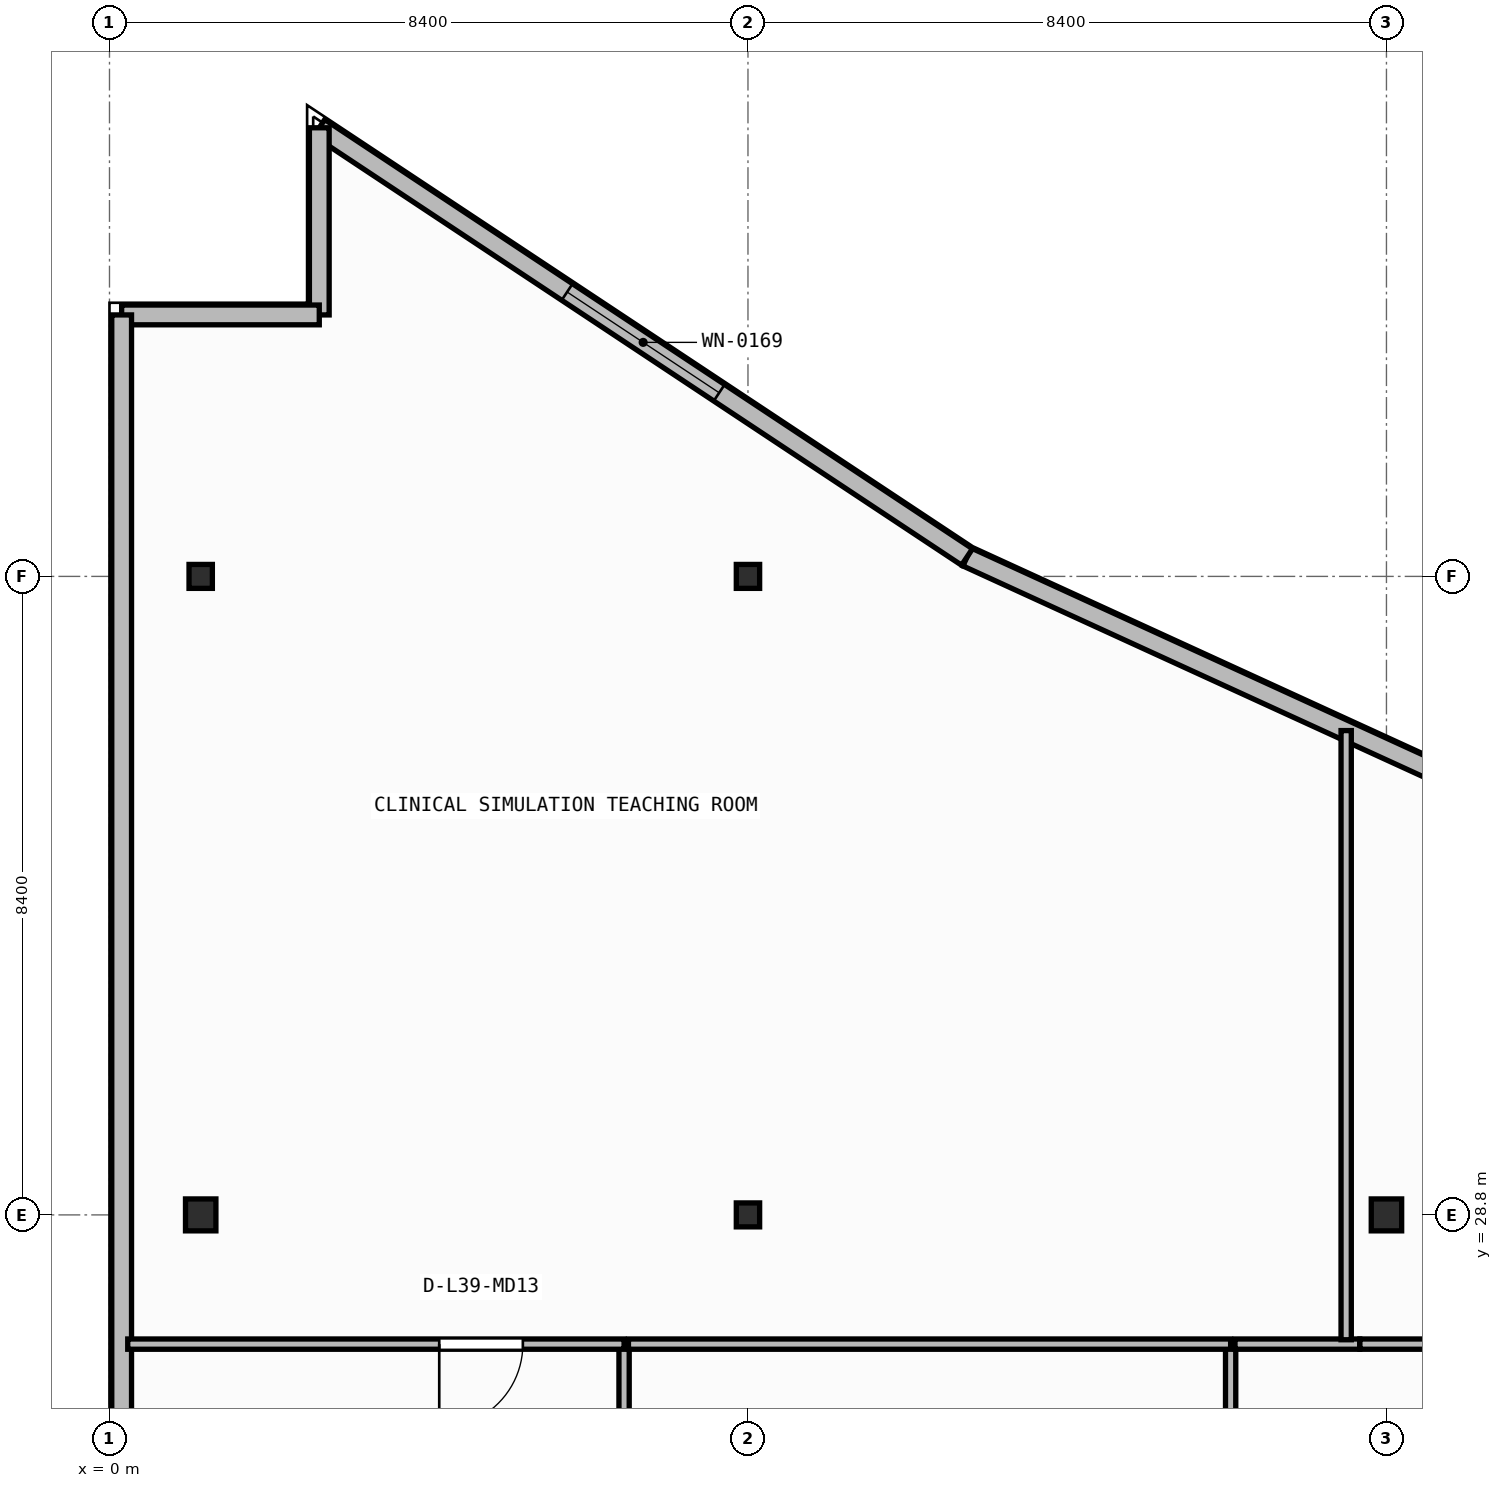
"""IFC4 building model, lengths in metres.
Left out: names, types, materials, properties, quantities, classifications, styles, units other than length and angle.
Written with IfcOpenShell. Run it as: python <this file> out.ifc"""

import sys

from ifc_helpers import new_model, si_unit, direction, frame, frame_2d, origin, origin_2d, place, context, subcontext, project, spatial, rectangle, i_section, extrude, element, fill, save


model = new_model("IFC4")
c1 = context("Model", 3, precision=1e-05, world=origin(), true_north=direction((0.0, 1.0)))
c2 = subcontext(c1, "Body", "Model", "MODEL_VIEW")
j1 = project(units=[si_unit("LENGTHUNIT", "METRE"), si_unit("PLANEANGLEUNIT", "RADIAN")], contexts=[c1])
p1 = place(None, origin())
s1 = spatial("IfcSite", under=j1, at=p1, CompositionType="ELEMENT")
p2 = place(p1, origin())
s2 = spatial("IfcBuilding", under=s1, at=p2, CompositionType="ELEMENT")
p3 = place(p2, frame((0.0, 0.0, 158.65)))
s3 = spatial("IfcBuildingStorey", under=s2, at=p3, CompositionType="ELEMENT", Elevation=158.65)
p4 = place(p3, frame((1.2, 28.8, 0.0), z_axis=(0.0, 0.0, 1.0), x_axis=(1.0, 0.0, 0.0)))
e1 = element("IfcColumn", 1, at=p4, inside=s3, PredefinedType="COLUMN", context=c2, shape_type="SweptSolid", body=[
    extrude(i_section(OverallWidth=0.4, OverallDepth=0.42, WebThickness=0.025, FlangeThickness=0.04, at=origin_2d()), origin(), (0.0, 0.0, 1.0), 3.95),
])
p5 = place(p3, frame((8.4, 28.8, 0.0), z_axis=(0.0, 0.0, 1.0), x_axis=(1.0, 0.0, 0.0)))
e2 = element("IfcColumn", 2, at=p5, inside=s3, PredefinedType="COLUMN", context=c2, shape_type="SweptSolid", body=[
    extrude(i_section(OverallWidth=0.307, OverallDepth=0.315, WebThickness=0.012, FlangeThickness=0.019, FilletRadius=0.017, at=origin_2d()), origin(), (0.0, 0.0, 1.0), 3.95),
])
p6 = place(p3, frame((16.8, 28.8, 0.0), z_axis=(0.0, 0.0, 1.0), x_axis=(1.0, 0.0, 0.0)))
e3 = element("IfcColumn", 3, at=p6, inside=s3, PredefinedType="COLUMN", context=c2, shape_type="SweptSolid", body=[
    extrude(i_section(OverallWidth=0.4, OverallDepth=0.42, WebThickness=0.025, FlangeThickness=0.04, at=origin_2d()), origin(), (0.0, 0.0, 1.0), 3.95),
])
for number, where, z_axis, x_axis in (
    (4, (1.2, 37.2, 0.0), (0.0, 0.0, 1.0), (1.0, 0.0, 0.0)),
    (5, (8.4, 37.2, 0.0), (0.0, 0.0, 1.0), (1.0, 0.0, 0.0)),
):
    element("IfcColumn", number, at=place(p3, frame(where, z_axis=z_axis, x_axis=x_axis)), inside=s3, PredefinedType="COLUMN", context=c2, shape_type="SweptSolid", body=[
        extrude(i_section(OverallWidth=0.307, OverallDepth=0.315, WebThickness=0.012, FlangeThickness=0.019, FilletRadius=0.017, at=origin_2d()), origin(), (0.0, 0.0, 1.0), 3.95),
    ])
p7 = place(p3, frame((23.818, 31.716, 0.0), z_axis=(0.0, 0.0, 1.0), x_axis=(-0.909209527513, 0.416338846471, 0.0)))
e6 = element("IfcWall", 6, at=p7, inside=s3, PredefinedType="STANDARD", context=c2, shape_type="SweptSolid", body=[
    extrude(rectangle(XDim=13.787, YDim=0.26, at=frame_2d((6.894, 0.0))), origin(), (0.0, 0.0, 1.0), 3.71),
])
p8 = place(p7, frame((3.829, 0.0, 0.9)))
e7 = element("IfcOpeningElement", 7, at=p8, cuts=e6, PredefinedType="OPENING", context=c2, shape_type="SweptSolid", body=[
    extrude(rectangle(XDim=2.4, YDim=1.65, at=frame_2d((1.2, 0.825))), frame((0.0, 0.14, 0.0), z_axis=(0.0, -1.0, 0.0), x_axis=(1.0, 0.0, 0.0)), (0.0, 0.0, 1.0), 0.28),
])
p9 = place(p3, frame((11.282, 37.456, 0.0), z_axis=(0.0, 0.0, 1.0), x_axis=(-0.833630474253, 0.552322580017, 0.0)))
e8 = element("IfcWall", 8, at=p9, inside=s3, PredefinedType="STANDARD", context=c2, shape_type="SweptSolid", body=[
    extrude(rectangle(XDim=10.223, YDim=0.26, at=frame_2d((5.111, 0.0))), origin(), (0.0, 0.0, 1.0), 3.71),
])
p10 = place(p9, frame((3.911, 0.0, 0.9)))
e9 = element("IfcOpeningElement", 9, at=p10, cuts=e8, PredefinedType="OPENING", context=c2, shape_type="SweptSolid", body=[
    extrude(rectangle(XDim=2.4, YDim=1.65, at=frame_2d((1.2, 0.825))), frame((0.0, 0.14, 0.0), z_axis=(0.0, -1.0, 0.0), x_axis=(1.0, 0.0, 0.0)), (0.0, 0.0, 1.0), 0.28),
])
p11 = place(p3, frame((2.76, 43.102, 0.0), z_axis=(0.0, 0.0, 1.0), x_axis=(0.0, -1.0, 0.0)))
e10 = element("IfcWall", 10, at=p11, inside=s3, PredefinedType="STANDARD", context=c2, shape_type="SweptSolid", body=[
    extrude(rectangle(XDim=2.462, YDim=0.26, at=frame_2d((1.231, 0.0))), origin(), (0.0, 0.0, 1.0), 3.71),
])
p12 = place(p3, frame((2.76, 40.64, 0.0), z_axis=(0.0, 0.0, 1.0), x_axis=(-1.0, 0.0, 0.0)))
e11 = element("IfcWall", 11, at=p12, inside=s3, PredefinedType="STANDARD", context=c2, shape_type="SweptSolid", body=[
    extrude(rectangle(XDim=2.6, YDim=0.26, at=frame_2d((1.3, 0.0))), origin(), (0.0, 0.0, 1.0), 3.71),
])
p13 = place(p3, frame((0.16, 40.64, 0.0), z_axis=(0.0, 0.0, 1.0), x_axis=(0.0, -1.0, 0.0)))
e12 = element("IfcWall", 12, at=p13, inside=s3, PredefinedType="STANDARD", context=c2, shape_type="SweptSolid", body=[
    extrude(rectangle(XDim=37.88, YDim=0.26, at=frame_2d((18.94, 0.0))), origin(), (0.0, 0.0, 1.0), 3.71),
])
p14 = place(p13, frame((29.865, 0.0, 0.0)))
e13 = element("IfcOpeningElement", 13, at=p14, cuts=e12, PredefinedType="OPENING", context=c2, shape_type="SweptSolid", body=[
    extrude(rectangle(XDim=1.3, YDim=2.15, at=frame_2d((0.65, 1.075))), frame((0.0, 0.14, 0.0), z_axis=(0.0, -1.0, 0.0), x_axis=(1.0, 0.0, 0.0)), (0.0, 0.0, 1.0), 0.28),
])
p15 = place(p3, frame((6.77, 20.607, 0.0), z_axis=(0.0, 0.0, 1.0), x_axis=(0.0, 1.0, 0.0)))
e14 = element("IfcWall", 14, at=p15, inside=s3, PredefinedType="PARTITIONING", context=c2, shape_type="SweptSolid", body=[
    extrude(rectangle(XDim=6.493, YDim=0.135, at=frame_2d((3.246, 0.0))), origin(), (0.0, 0.0, 1.0), 3.71),
])
p16 = place(p3, frame((6.77, 27.1, 0.0), z_axis=(0.0, 0.0, 1.0), x_axis=(-1.0, 0.0, 0.0)))
e15 = element("IfcWall", 15, at=p16, inside=s3, PredefinedType="PARTITIONING", context=c2, shape_type="SweptSolid", body=[
    extrude(rectangle(XDim=6.53, YDim=0.135, at=frame_2d((3.265, 0.0))), origin(), (0.0, 0.0, 1.0), 3.71),
])
p17 = place(p16, frame((1.332, 0.0, 0.0)))
e16 = element("IfcOpeningElement", 16, at=p17, cuts=e15, PredefinedType="OPENING", context=c2, shape_type="SweptSolid", body=[
    extrude(rectangle(XDim=1.1, YDim=2.1, at=frame_2d((0.55, 1.05))), frame((0.0, 0.077, 0.0), z_axis=(0.0, -1.0, 0.0), x_axis=(1.0, 0.0, 0.0)), (0.0, 0.0, 1.0), 0.155),
])
p18 = place(p3, frame((14.75, 20.607, 0.0), z_axis=(0.0, 0.0, 1.0), x_axis=(0.0, 1.0, 0.0)))
e17 = element("IfcWall", 17, at=p18, inside=s3, PredefinedType="PARTITIONING", context=c2, shape_type="SweptSolid", body=[
    extrude(rectangle(XDim=6.493, YDim=0.135, at=frame_2d((3.246, 0.0))), origin(), (0.0, 0.0, 1.0), 3.71),
])
p19 = place(p3, frame((14.75, 27.1, 0.0), z_axis=(0.0, 0.0, 1.0), x_axis=(-1.0, 0.0, 0.0)))
e18 = element("IfcWall", 18, at=p19, inside=s3, PredefinedType="PARTITIONING", context=c2, shape_type="SweptSolid", body=[
    extrude(rectangle(XDim=7.923, YDim=0.135, at=frame_2d((3.961, 0.0))), origin(), (0.0, 0.0, 1.0), 3.71),
])
p20 = place(p3, frame((16.448, 27.1, 0.0), z_axis=(0.0, 0.0, 1.0), x_axis=(-1.0, 0.0, 0.0)))
e19 = element("IfcWall", 19, at=p20, inside=s3, PredefinedType="PARTITIONING", context=c2, shape_type="SweptSolid", body=[
    extrude(rectangle(XDim=1.641, YDim=0.135, at=frame_2d((0.82, 0.0))), origin(), (0.0, 0.0, 1.0), 3.71),
])
p21 = place(p3, frame((19.12, 27.1, 0.0), z_axis=(0.0, 0.0, 1.0), x_axis=(-1.0, 0.0, 0.0)))
e20 = element("IfcWall", 20, at=p21, inside=s3, PredefinedType="PARTITIONING", context=c2, shape_type="SweptSolid", body=[
    extrude(rectangle(XDim=2.67, YDim=0.135, at=frame_2d((1.335, 0.0))), origin(), (0.0, 0.0, 1.0), 3.71),
])
p22 = place(p3, frame((16.27, 27.157, 0.0), z_axis=(0.0, 0.0, 1.0), x_axis=(0.0, 1.0, 0.0)))
e21 = element("IfcWall", 21, at=p22, inside=s3, PredefinedType="PARTITIONING", context=c2, shape_type="SweptSolid", body=[
    extrude(rectangle(XDim=8.014, YDim=0.135, at=frame_2d((4.007, 0.0))), origin(), (0.0, 0.0, 1.0), 3.71),
])
p23 = place(p10, origin())
e22 = element("IfcWindow", 22, at=p23, inside=s3, PartitioningType="SINGLE_PANEL", PredefinedType="WINDOW", context=c2, shape_type="SweptSolid", body=[
    extrude(rectangle(XDim=2.4, YDim=1.65, at=frame_2d((1.2, 0.825))), frame((0.0, 0.03, 0.0), z_axis=(0.0, -1.0, 0.0), x_axis=(1.0, 0.0, 0.0)), (0.0, 0.0, 1.0), 0.06),
])
fill(e9, e22)
p24 = place(p17, origin())
e23 = element("IfcDoor", 23, at=p24, inside=s3, OperationType="SINGLE_SWING_RIGHT", PredefinedType="DOOR", context=c2, shape_type="SweptSolid", body=[
    extrude(rectangle(XDim=1.1, YDim=2.1, at=frame_2d((0.55, 1.05))), frame((0.0, 0.025, 0.0), z_axis=(0.0, -1.0, 0.0), x_axis=(1.0, 0.0, 0.0)), (0.0, 0.0, 1.0), 0.05),
])
fill(e16, e23)
save(model, sys.argv[1])
